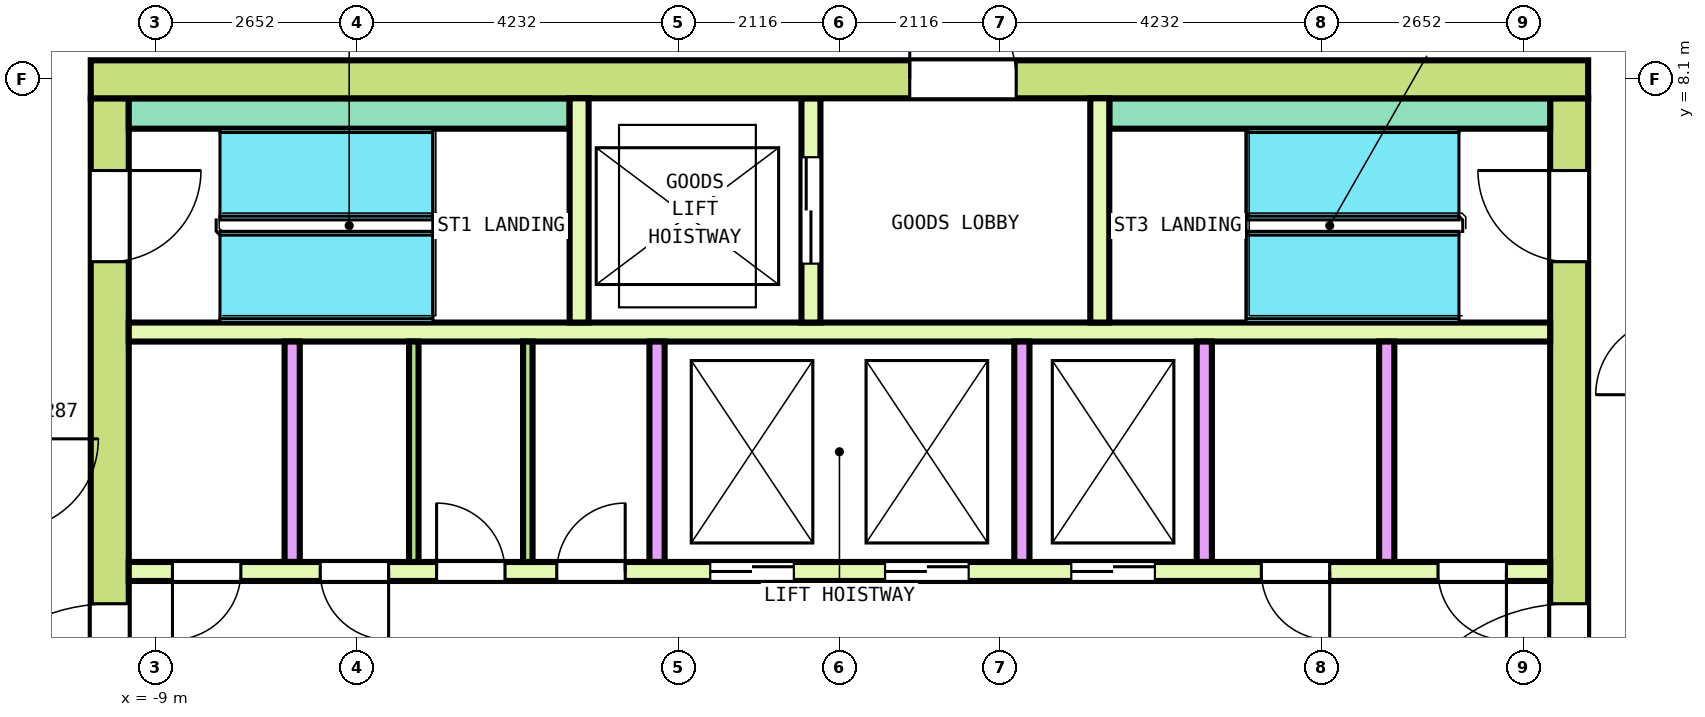
"""IFC4 building model, lengths in metres.
Left out: names, types, materials, properties, quantities, classifications, styles, units other than length and angle.
Written with IfcOpenShell. Run it as: python <this file> out.ifc"""

import sys

from ifc_helpers import new_model, si_unit, direction, frame, frame_2d, origin, place, context, subcontext, project, spatial, rectangle, extrude, element, fill, save


model = new_model("IFC4")
c1 = context("Model", 3, precision=1e-05, world=origin(), true_north=direction((0.0, 1.0)))
c2 = subcontext(c1, "Body", "Model", "MODEL_VIEW")
j1 = project(units=[si_unit("LENGTHUNIT", "METRE"), si_unit("PLANEANGLEUNIT", "RADIAN")], contexts=[c1])
p1 = place(None, origin())
s1 = spatial("IfcSite", under=j1, at=p1, CompositionType="ELEMENT")
p2 = place(p1, origin())
s2 = spatial("IfcBuilding", under=s1, at=p2, CompositionType="ELEMENT")
p3 = place(p2, frame((0.0, 0.0, 308.6)))
s3 = spatial("IfcBuildingStorey", under=s2, at=p3, CompositionType="ELEMENT", Elevation=308.6)
p4 = place(p3, frame((-9.85, 8.1, 0.0), z_axis=(0.0, 0.0, 1.0), x_axis=(1.0, 0.0, 0.0)))
e1 = element("IfcWall", 1, at=p4, inside=s3, PredefinedType="SHEAR", context=c2, shape_type="SweptSolid", body=[
    extrude(rectangle(XDim=19.7, YDim=0.5, at=frame_2d((9.85, 0.0))), origin(), (0.0, 0.0, 1.0), 3.7),
])
p5 = place(p4, frame((10.775, 0.0, 0.0)))
e2 = element("IfcOpeningElement", 2, at=p5, cuts=e1, PredefinedType="OPENING", context=c2, shape_type="SweptSolid", body=[
    extrude(rectangle(XDim=1.4, YDim=2.1, at=frame_2d((0.7, 1.05))), frame((0.0, 0.26, 0.0), z_axis=(0.0, -1.0, 0.0), x_axis=(1.0, 0.0, 0.0)), (0.0, 0.0, 1.0), 0.52),
])
p6 = place(p3, frame((-9.6, -7.85, 0.0), z_axis=(0.0, 0.0, 1.0), x_axis=(0.0, 1.0, 0.0)))
e3 = element("IfcWall", 3, at=p6, inside=s3, PredefinedType="SHEAR", context=c2, shape_type="SweptSolid", body=[
    extrude(rectangle(XDim=15.7, YDim=0.5, at=frame_2d((7.85, 0.0))), origin(), (0.0, 0.0, 1.0), 3.7),
])
p7 = place(p6, frame((6.65, 0.0, 0.0)))
e4 = element("IfcOpeningElement", 4, at=p7, cuts=e3, PredefinedType="OPENING", context=c2, shape_type="SweptSolid", body=[
    extrude(rectangle(XDim=2.4, YDim=2.1, at=frame_2d((1.2, 1.05))), frame((0.0, 0.26, 0.0), z_axis=(0.0, -1.0, 0.0), x_axis=(1.0, 0.0, 0.0)), (0.0, 0.0, 1.0), 0.52),
])
p8 = place(p6, frame((13.55, 0.0, 0.0)))
e5 = element("IfcOpeningElement", 5, at=p8, cuts=e3, PredefinedType="OPENING", context=c2, shape_type="SweptSolid", body=[
    extrude(rectangle(XDim=1.2, YDim=2.1, at=frame_2d((0.6, 1.05))), frame((0.0, 0.26, 0.0), z_axis=(0.0, -1.0, 0.0), x_axis=(1.0, 0.0, 0.0)), (0.0, 0.0, 1.0), 0.52),
])
p9 = place(p6, frame((0.95, 0.0, 0.0)))
e6 = element("IfcOpeningElement", 6, at=p9, cuts=e3, PredefinedType="OPENING", context=c2, shape_type="SweptSolid", body=[
    extrude(rectangle(XDim=1.2, YDim=2.1, at=frame_2d((0.6, 1.05))), frame((0.0, 0.26, 0.0), z_axis=(0.0, -1.0, 0.0), x_axis=(1.0, 0.0, 0.0)), (0.0, 0.0, 1.0), 0.52),
])
p10 = place(p3, frame((9.6, -7.85, 0.0), z_axis=(0.0, 0.0, 1.0), x_axis=(0.0, 1.0, 0.0)))
e7 = element("IfcWall", 7, at=p10, inside=s3, PredefinedType="SHEAR", context=c2, shape_type="SweptSolid", body=[
    extrude(rectangle(XDim=15.7, YDim=0.5, at=frame_2d((7.85, 0.0))), origin(), (0.0, 0.0, 1.0), 3.7),
])
p11 = place(p10, frame((6.65, 0.0, 0.0)))
e8 = element("IfcOpeningElement", 8, at=p11, cuts=e7, PredefinedType="OPENING", context=c2, shape_type="SweptSolid", body=[
    extrude(rectangle(XDim=2.4, YDim=2.1, at=frame_2d((1.2, 1.05))), frame((0.0, 0.26, 0.0), z_axis=(0.0, -1.0, 0.0), x_axis=(1.0, 0.0, 0.0)), (0.0, 0.0, 1.0), 0.52),
])
p12 = place(p10, frame((13.55, 0.0, 0.0)))
e9 = element("IfcOpeningElement", 9, at=p12, cuts=e7, PredefinedType="OPENING", context=c2, shape_type="SweptSolid", body=[
    extrude(rectangle(XDim=1.2, YDim=2.1, at=frame_2d((0.6, 1.05))), frame((0.0, 0.26, 0.0), z_axis=(0.0, -1.0, 0.0), x_axis=(1.0, 0.0, 0.0)), (0.0, 0.0, 1.0), 0.52),
])
p13 = place(p10, frame((1.05, 0.0, 0.0)))
e10 = element("IfcOpeningElement", 10, at=p13, cuts=e7, PredefinedType="OPENING", context=c2, shape_type="SweptSolid", body=[
    extrude(rectangle(XDim=1.0, YDim=2.1, at=frame_2d((0.5, 1.05))), frame((0.0, 0.26, 0.0), z_axis=(0.0, -1.0, 0.0), x_axis=(1.0, 0.0, 0.0)), (0.0, 0.0, 1.0), 0.52),
])
p14 = place(p3, frame((-9.35, 1.625, 0.0), z_axis=(0.0, 0.0, 1.0), x_axis=(1.0, 0.0, 0.0)))
e11 = element("IfcWall", 11, at=p14, inside=s3, PredefinedType="SOLIDWALL", context=c2, shape_type="SweptSolid", body=[
    extrude(rectangle(XDim=18.7, YDim=0.25, at=frame_2d((9.35, 0.0))), origin(), (0.0, 0.0, 1.0), 3.7),
])
p15 = place(p14, frame((7.65, 0.0, 0.0)))
e12 = element("IfcOpeningElement", 12, at=p15, cuts=e11, PredefinedType="OPENING", context=c2, shape_type="SweptSolid", body=[
    extrude(rectangle(XDim=1.1, YDim=2.1, at=frame_2d((0.55, 1.05))), frame((0.0, 0.135, 0.0), z_axis=(0.0, -1.0, 0.0), x_axis=(1.0, 0.0, 0.0)), (0.0, 0.0, 1.0), 0.27),
])
p16 = place(p14, frame((9.95, 0.0, 0.0)))
e13 = element("IfcOpeningElement", 13, at=p16, cuts=e11, PredefinedType="OPENING", context=c2, shape_type="SweptSolid", body=[
    extrude(rectangle(XDim=1.1, YDim=2.1, at=frame_2d((0.55, 1.05))), frame((0.0, 0.135, 0.0), z_axis=(0.0, -1.0, 0.0), x_axis=(1.0, 0.0, 0.0)), (0.0, 0.0, 1.0), 0.27),
])
p17 = place(p14, frame((12.4, 0.0, 0.0)))
e14 = element("IfcOpeningElement", 14, at=p17, cuts=e11, PredefinedType="OPENING", context=c2, shape_type="SweptSolid", body=[
    extrude(rectangle(XDim=1.1, YDim=2.1, at=frame_2d((0.55, 1.05))), frame((0.0, 0.135, 0.0), z_axis=(0.0, -1.0, 0.0), x_axis=(1.0, 0.0, 0.0)), (0.0, 0.0, 1.0), 0.27),
])
p18 = place(p14, frame((0.575, 0.0, 0.0)))
e15 = element("IfcOpeningElement", 15, at=p18, cuts=e11, PredefinedType="OPENING", context=c2, shape_type="SweptSolid", body=[
    extrude(rectangle(XDim=0.9, YDim=2.1, at=frame_2d((0.45, 1.05))), frame((0.0, 0.135, 0.0), z_axis=(0.0, -1.0, 0.0), x_axis=(1.0, 0.0, 0.0)), (0.0, 0.0, 1.0), 0.27),
])
p19 = place(p14, frame((2.519, 0.0, 0.0)))
e16 = element("IfcOpeningElement", 16, at=p19, cuts=e11, PredefinedType="OPENING", context=c2, shape_type="SweptSolid", body=[
    extrude(rectangle(XDim=0.9, YDim=2.1, at=frame_2d((0.45, 1.05))), frame((0.0, 0.135, 0.0), z_axis=(0.0, -1.0, 0.0), x_axis=(1.0, 0.0, 0.0)), (0.0, 0.0, 1.0), 0.27),
])
p20 = place(p14, frame((4.05, 0.0, 0.0)))
e17 = element("IfcOpeningElement", 17, at=p20, cuts=e11, PredefinedType="OPENING", context=c2, shape_type="SweptSolid", body=[
    extrude(rectangle(XDim=0.9, YDim=2.1, at=frame_2d((0.45, 1.05))), frame((0.0, 0.135, 0.0), z_axis=(0.0, -1.0, 0.0), x_axis=(1.0, 0.0, 0.0)), (0.0, 0.0, 1.0), 0.27),
])
p21 = place(p14, frame((5.631, 0.0, 0.0)))
e18 = element("IfcOpeningElement", 18, at=p21, cuts=e11, PredefinedType="OPENING", context=c2, shape_type="SweptSolid", body=[
    extrude(rectangle(XDim=0.9, YDim=2.1, at=frame_2d((0.45, 1.05))), frame((0.0, 0.135, 0.0), z_axis=(0.0, -1.0, 0.0), x_axis=(1.0, 0.0, 0.0)), (0.0, 0.0, 1.0), 0.27),
])
p22 = place(p14, frame((14.9, 0.0, 0.0)))
e19 = element("IfcOpeningElement", 19, at=p22, cuts=e11, PredefinedType="OPENING", context=c2, shape_type="SweptSolid", body=[
    extrude(rectangle(XDim=0.9, YDim=2.1, at=frame_2d((0.45, 1.05))), frame((0.0, 0.135, 0.0), z_axis=(0.0, -1.0, 0.0), x_axis=(1.0, 0.0, 0.0)), (0.0, 0.0, 1.0), 0.27),
])
p23 = place(p14, frame((17.225, 0.0, 0.0)))
e20 = element("IfcOpeningElement", 20, at=p23, cuts=e11, PredefinedType="OPENING", context=c2, shape_type="SweptSolid", body=[
    extrude(rectangle(XDim=0.9, YDim=2.1, at=frame_2d((0.45, 1.05))), frame((0.0, 0.135, 0.0), z_axis=(0.0, -1.0, 0.0), x_axis=(1.0, 0.0, 0.0)), (0.0, 0.0, 1.0), 0.27),
])
p24 = place(p3, frame((-9.35, 4.775, 0.0), z_axis=(0.0, 0.0, 1.0), x_axis=(1.0, 0.0, 0.0)))
e21 = element("IfcWall", 21, at=p24, inside=s3, PredefinedType="SOLIDWALL", context=c2, shape_type="SweptSolid", body=[
    extrude(rectangle(XDim=18.7, YDim=0.25, at=frame_2d((9.35, 0.0))), origin(), (0.0, 0.0, 1.0), 3.7),
])
for number, where, z_axis, x_axis in (
    (22, (-7.2, 1.75, 0.0), (0.0, 0.0, 1.0), (0.0, 1.0, 0.0)),
    (23, (-2.4, 1.75, 0.0), (0.0, 0.0, 1.0), (0.0, 1.0, 0.0)),
    (24, (2.4, 1.75, 0.0), (0.0, 0.0, 1.0), (0.0, 1.0, 0.0)),
    (25, (4.8, 1.75, 0.0), (0.0, 0.0, 1.0), (0.0, 1.0, 0.0)),
    (26, (7.2, 1.75, 0.0), (0.0, 0.0, 1.0), (0.0, 1.0, 0.0)),
):
    element("IfcWall", number, at=place(p3, frame(where, z_axis=z_axis, x_axis=x_axis)), inside=s3, PredefinedType="SOLIDWALL", context=c2, shape_type="SweptSolid", body=[
        extrude(rectangle(XDim=2.9, YDim=0.2, at=frame_2d((1.45, 0.0))), origin(), (0.0, 0.0, 1.0), 3.7),
    ])
for number, where, z_axis, x_axis in (
    (27, (-9.35, 7.65, 0.0), (0.0, 0.0, 1.0), (1.0, 0.0, 0.0)),
    (28, (3.55, 7.65, 0.0), (0.0, 0.0, 1.0), (1.0, 0.0, 0.0)),
):
    element("IfcWall", number, at=place(p3, frame(where, z_axis=z_axis, x_axis=x_axis)), inside=s3, PredefinedType="SOLIDWALL", context=c2, shape_type="SweptSolid", body=[
        extrude(rectangle(XDim=5.8, YDim=0.4, at=frame_2d((2.9, 0.0))), origin(), (0.0, 0.0, 1.0), 3.7),
    ])
p25 = place(p3, frame((-3.425, 4.9, 0.0), z_axis=(0.0, 0.0, 1.0), x_axis=(0.0, 1.0, 0.0)))
e29 = element("IfcWall", 29, at=p25, inside=s3, PredefinedType="SOLIDWALL", context=c2, shape_type="SweptSolid", body=[
    extrude(rectangle(XDim=2.95, YDim=0.25, at=frame_2d((1.475, 0.0))), origin(), (0.0, 0.0, 1.0), 3.7),
])
p26 = place(p3, frame((-0.375, 4.9, 0.0), z_axis=(0.0, 0.0, 1.0), x_axis=(0.0, 1.0, 0.0)))
e30 = element("IfcWall", 30, at=p26, inside=s3, PredefinedType="SOLIDWALL", context=c2, shape_type="SweptSolid", body=[
    extrude(rectangle(XDim=2.95, YDim=0.25, at=frame_2d((1.475, 0.0))), origin(), (0.0, 0.0, 1.0), 3.7),
])
p27 = place(p26, frame((0.775, 0.0, 0.0)))
e31 = element("IfcOpeningElement", 31, at=p27, cuts=e30, PredefinedType="OPENING", context=c2, shape_type="SweptSolid", body=[
    extrude(rectangle(XDim=1.4, YDim=2.1, at=frame_2d((0.7, 1.05))), frame((0.0, 0.135, 0.0), z_axis=(0.0, -1.0, 0.0), x_axis=(1.0, 0.0, 0.0)), (0.0, 0.0, 1.0), 0.27),
])
p28 = place(p3, frame((3.425, 4.9, 0.0), z_axis=(0.0, 0.0, 1.0), x_axis=(0.0, 1.0, 0.0)))
e32 = element("IfcWall", 32, at=p28, inside=s3, PredefinedType="SOLIDWALL", context=c2, shape_type="SweptSolid", body=[
    extrude(rectangle(XDim=2.95, YDim=0.25, at=frame_2d((1.475, 0.0))), origin(), (0.0, 0.0, 1.0), 3.7),
])
for number, where, z_axis, x_axis in (
    (33, (-5.6, 1.75, 0.0), (0.0, 0.0, 1.0), (0.0, 1.0, 0.0)),
    (34, (-4.1, 1.75, 0.0), (0.0, 0.0, 1.0), (0.0, 1.0, 0.0)),
):
    element("IfcWall", number, at=place(p3, frame(where, z_axis=z_axis, x_axis=x_axis)), inside=s3, PredefinedType="PARTITIONING", context=c2, shape_type="SweptSolid", body=[
        extrude(rectangle(XDim=2.9, YDim=0.125, at=frame_2d((1.45, 0.0))), origin(), (0.0, 0.0, 1.0), 3.7),
    ])
p29 = place(p15, origin())
e35 = element("IfcDoor", 35, at=p29, inside=s3, OperationType="DOUBLE_DOOR_SLIDING", PredefinedType="DOOR", context=c2, shape_type="SweptSolid", body=[
    extrude(rectangle(XDim=1.1, YDim=2.1, at=frame_2d((0.55, 1.05))), frame((0.0, 0.075, 0.0), z_axis=(0.0, -1.0, 0.0), x_axis=(1.0, 0.0, 0.0)), (0.0, 0.0, 1.0), 0.15),
])
fill(e12, e35)
p30 = place(p16, origin())
e36 = element("IfcDoor", 36, at=p30, inside=s3, OperationType="DOUBLE_DOOR_SLIDING", PredefinedType="DOOR", context=c2, shape_type="SweptSolid", body=[
    extrude(rectangle(XDim=1.1, YDim=2.1, at=frame_2d((0.55, 1.05))), frame((0.0, 0.075, 0.0), z_axis=(0.0, -1.0, 0.0), x_axis=(1.0, 0.0, 0.0)), (0.0, 0.0, 1.0), 0.15),
])
fill(e13, e36)
p31 = place(p17, origin())
e37 = element("IfcDoor", 37, at=p31, inside=s3, OperationType="DOUBLE_DOOR_SLIDING", PredefinedType="DOOR", context=c2, shape_type="SweptSolid", body=[
    extrude(rectangle(XDim=1.1, YDim=2.1, at=frame_2d((0.55, 1.05))), frame((0.0, 0.075, 0.0), z_axis=(0.0, -1.0, 0.0), x_axis=(1.0, 0.0, 0.0)), (0.0, 0.0, 1.0), 0.15),
])
fill(e14, e37)
p32 = place(p27, origin())
e38 = element("IfcDoor", 38, at=p32, inside=s3, OperationType="DOUBLE_DOOR_SLIDING", PredefinedType="DOOR", context=c2, shape_type="SweptSolid", body=[
    extrude(rectangle(XDim=1.4, YDim=2.1, at=frame_2d((0.7, 1.05))), frame((0.0, 0.075, 0.0), z_axis=(0.0, -1.0, 0.0), x_axis=(1.0, 0.0, 0.0)), (0.0, 0.0, 1.0), 0.15),
])
fill(e31, e38)
p33 = place(p7, origin())
e39 = element("IfcDoor", 39, at=p33, inside=s3, OperationType="DOUBLE_DOOR_SINGLE_SWING", PredefinedType="DOOR", context=c2, shape_type="SweptSolid", body=[
    extrude(rectangle(XDim=2.4, YDim=2.1, at=frame_2d((1.2, 1.05))), frame((0.0, 0.2, 0.0), z_axis=(0.0, -1.0, 0.0), x_axis=(1.0, 0.0, 0.0)), (0.0, 0.0, 1.0), 0.4),
])
fill(e4, e39)
p34 = place(p11, origin())
e40 = element("IfcDoor", 40, at=p34, inside=s3, OperationType="DOUBLE_DOOR_SINGLE_SWING", PredefinedType="DOOR", context=c2, shape_type="SweptSolid", body=[
    extrude(rectangle(XDim=2.4, YDim=2.1, at=frame_2d((1.2, 1.05))), frame((0.0, 0.2, 0.0), z_axis=(0.0, -1.0, 0.0), x_axis=(1.0, 0.0, 0.0)), (0.0, 0.0, 1.0), 0.4),
])
fill(e8, e40)
p35 = place(p8, origin())
e41 = element("IfcDoor", 41, at=p35, inside=s3, OperationType="SINGLE_SWING_LEFT", PredefinedType="DOOR", context=c2, shape_type="SweptSolid", body=[
    extrude(rectangle(XDim=1.2, YDim=2.1, at=frame_2d((0.6, 1.05))), frame((0.0, 0.2, 0.0), z_axis=(0.0, -1.0, 0.0), x_axis=(1.0, 0.0, 0.0)), (0.0, 0.0, 1.0), 0.4),
])
fill(e5, e41)
p36 = place(p12, origin())
e42 = element("IfcDoor", 42, at=p36, inside=s3, OperationType="SINGLE_SWING_LEFT", PredefinedType="DOOR", context=c2, shape_type="SweptSolid", body=[
    extrude(rectangle(XDim=1.2, YDim=2.1, at=frame_2d((0.6, 1.05))), frame((0.0, 0.2, 0.0), z_axis=(0.0, -1.0, 0.0), x_axis=(1.0, 0.0, 0.0)), (0.0, 0.0, 1.0), 0.4),
])
fill(e9, e42)
p37 = place(p5, origin())
e43 = element("IfcDoor", 43, at=p37, inside=s3, OperationType="DOUBLE_DOOR_SINGLE_SWING", PredefinedType="DOOR", context=c2, shape_type="SweptSolid", body=[
    extrude(rectangle(XDim=1.4, YDim=2.1, at=frame_2d((0.7, 1.05))), frame((0.0, 0.2, 0.0), z_axis=(0.0, -1.0, 0.0), x_axis=(1.0, 0.0, 0.0)), (0.0, 0.0, 1.0), 0.4),
])
fill(e2, e43)
p38 = place(p18, origin())
e44 = element("IfcDoor", 44, at=p38, inside=s3, OperationType="SINGLE_SWING_LEFT", PredefinedType="DOOR", context=c2, shape_type="SweptSolid", body=[
    extrude(rectangle(XDim=0.9, YDim=2.1, at=frame_2d((0.45, 1.05))), frame((0.0, 0.075, 0.0), z_axis=(0.0, -1.0, 0.0), x_axis=(1.0, 0.0, 0.0)), (0.0, 0.0, 1.0), 0.15),
])
fill(e15, e44)
p39 = place(p19, origin())
e45 = element("IfcDoor", 45, at=p39, inside=s3, OperationType="SINGLE_SWING_RIGHT", PredefinedType="DOOR", context=c2, shape_type="SweptSolid", body=[
    extrude(rectangle(XDim=0.9, YDim=2.1, at=frame_2d((0.45, 1.05))), frame((0.0, 0.075, 0.0), z_axis=(0.0, -1.0, 0.0), x_axis=(1.0, 0.0, 0.0)), (0.0, 0.0, 1.0), 0.15),
])
fill(e16, e45)
p40 = place(p20, origin())
e46 = element("IfcDoor", 46, at=p40, inside=s3, OperationType="SINGLE_SWING_LEFT", PredefinedType="DOOR", context=c2, shape_type="SweptSolid", body=[
    extrude(rectangle(XDim=0.9, YDim=2.1, at=frame_2d((0.45, 1.05))), frame((0.0, 0.075, 0.0), z_axis=(0.0, -1.0, 0.0), x_axis=(1.0, 0.0, 0.0)), (0.0, 0.0, 1.0), 0.15),
])
fill(e17, e46)
p41 = place(p21, origin())
e47 = element("IfcDoor", 47, at=p41, inside=s3, OperationType="SINGLE_SWING_RIGHT", PredefinedType="DOOR", context=c2, shape_type="SweptSolid", body=[
    extrude(rectangle(XDim=0.9, YDim=2.1, at=frame_2d((0.45, 1.05))), frame((0.0, 0.075, 0.0), z_axis=(0.0, -1.0, 0.0), x_axis=(1.0, 0.0, 0.0)), (0.0, 0.0, 1.0), 0.15),
])
fill(e18, e47)
p42 = place(p22, origin())
e48 = element("IfcDoor", 48, at=p42, inside=s3, OperationType="SINGLE_SWING_LEFT", PredefinedType="DOOR", context=c2, shape_type="SweptSolid", body=[
    extrude(rectangle(XDim=0.9, YDim=2.1, at=frame_2d((0.45, 1.05))), frame((0.0, 0.075, 0.0), z_axis=(0.0, -1.0, 0.0), x_axis=(1.0, 0.0, 0.0)), (0.0, 0.0, 1.0), 0.15),
])
fill(e19, e48)
p43 = place(p23, origin())
e49 = element("IfcDoor", 49, at=p43, inside=s3, OperationType="SINGLE_SWING_RIGHT", PredefinedType="DOOR", context=c2, shape_type="SweptSolid", body=[
    extrude(rectangle(XDim=0.9, YDim=2.1, at=frame_2d((0.45, 1.05))), frame((0.0, 0.075, 0.0), z_axis=(0.0, -1.0, 0.0), x_axis=(1.0, 0.0, 0.0)), (0.0, 0.0, 1.0), 0.15),
])
fill(e20, e49)
save(model, sys.argv[1])
